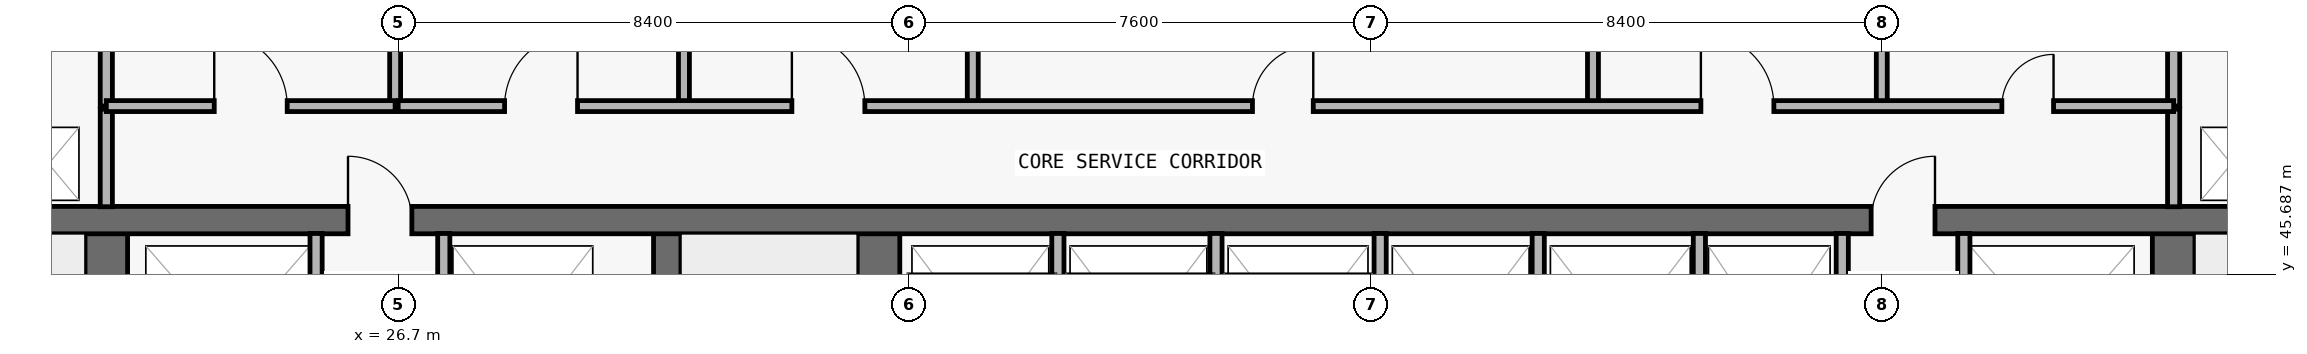
"""IFC4 building model, lengths in metres.
Left out: names, types, materials, properties, quantities, classifications, styles, units other than length and angle.
Written with IfcOpenShell. Run it as: python <this file> out.ifc"""

import sys

from ifc_helpers import new_model, si_unit, direction, frame, frame_2d, origin, place, context, subcontext, project, spatial, rectangle, extrude, element, fill, save


model = new_model("IFC4")
c1 = context("Model", 3, precision=1e-05, world=origin(), true_north=direction((0.0, 1.0)))
c2 = subcontext(c1, "Body", "Model", "MODEL_VIEW")
j1 = project(units=[si_unit("LENGTHUNIT", "METRE"), si_unit("PLANEANGLEUNIT", "RADIAN")], contexts=[c1])
p1 = place(None, origin())
s1 = spatial("IfcSite", under=j1, at=p1, CompositionType="ELEMENT")
p2 = place(p1, origin())
s2 = spatial("IfcBuilding", under=s1, at=p2, CompositionType="ELEMENT")
p3 = place(p2, frame((0.0, 0.0, 19.8)))
s3 = spatial("IfcBuildingStorey", under=s2, at=p3, CompositionType="ELEMENT", Elevation=19.8)
p4 = place(p3, frame((21.9, 36.9, 0.0), z_axis=(0.0, 0.0, 1.0), x_axis=(0.0, 1.0, 0.0)))
e1 = element("IfcWall", 1, at=p4, inside=s3, PredefinedType="SHEAR", context=c2, shape_type="SweptSolid", body=[
    extrude(rectangle(XDim=9.675, YDim=0.7, at=frame_2d((4.837, 0.0))), origin(), (0.0, 0.0, 1.0), 4.45),
])
p5 = place(p4, frame((0.65, 0.0, 0.0)))
e2 = element("IfcOpeningElement", 2, at=p5, cuts=e1, PredefinedType="OPENING", context=c2, shape_type="SweptSolid", body=[
    extrude(rectangle(XDim=1.1, YDim=2.15, at=frame_2d((0.55, 1.075))), frame((0.0, 0.36, 0.0), z_axis=(0.0, -1.0, 0.0), x_axis=(1.0, 0.0, 0.0)), (0.0, 0.0, 1.0), 0.72),
])
p6 = place(p3, frame((55.9, 36.9, 0.0), z_axis=(0.0, 0.0, 1.0), x_axis=(0.0, 1.0, 0.0)))
e3 = element("IfcWall", 3, at=p6, inside=s3, PredefinedType="SHEAR", context=c2, shape_type="SweptSolid", body=[
    extrude(rectangle(XDim=9.675, YDim=0.7, at=frame_2d((4.837, 0.0))), origin(), (0.0, 0.0, 1.0), 4.45),
])
p7 = place(p6, frame((0.65, 0.0, 0.0)))
e4 = element("IfcOpeningElement", 4, at=p7, cuts=e3, PredefinedType="OPENING", context=c2, shape_type="SweptSolid", body=[
    extrude(rectangle(XDim=1.1, YDim=2.15, at=frame_2d((0.55, 1.075))), frame((0.0, 0.36, 0.0), z_axis=(0.0, -1.0, 0.0), x_axis=(1.0, 0.0, 0.0)), (0.0, 0.0, 1.0), 0.72),
])
p8 = place(p3, frame((31.125, 36.9, 0.0), z_axis=(0.0, 0.0, 1.0), x_axis=(0.0, 1.0, 0.0)))
e5 = element("IfcWall", 5, at=p8, inside=s3, PredefinedType="SHEAR", context=c2, shape_type="SweptSolid", body=[
    extrude(rectangle(XDim=9.675, YDim=0.45, at=frame_2d((4.837, 0.0))), origin(), (0.0, 0.0, 1.0), 4.45),
])
p9 = place(p3, frame((34.6, 36.9, 0.0), z_axis=(0.0, 0.0, 1.0), x_axis=(0.0, 1.0, 0.0)))
e6 = element("IfcWall", 6, at=p9, inside=s3, PredefinedType="SHEAR", context=c2, shape_type="SweptSolid", body=[
    extrude(rectangle(XDim=9.675, YDim=0.7, at=frame_2d((4.837, 0.0))), origin(), (0.0, 0.0, 1.0), 4.45),
])
p10 = place(p3, frame((18.2, 46.575, 0.0), z_axis=(0.0, 0.0, 1.0), x_axis=(1.0, 0.0, 0.0)))
e7 = element("IfcWall", 7, at=p10, inside=s3, PredefinedType="SHEAR", context=c2, shape_type="SweptSolid", body=[
    extrude(rectangle(XDim=41.4, YDim=0.45, at=frame_2d((20.7, 0.0))), origin(), (0.0, 0.0, 1.0), 4.45),
])
p11 = place(p10, frame((7.675, 0.0, 0.0)))
e8 = element("IfcOpeningElement", 8, at=p11, cuts=e7, PredefinedType="OPENING", context=c2, shape_type="SweptSolid", body=[
    extrude(rectangle(XDim=1.05, YDim=2.15, at=frame_2d((0.525, 1.075))), frame((0.0, 0.235, 0.0), z_axis=(0.0, -1.0, 0.0), x_axis=(1.0, 0.0, 0.0)), (0.0, 0.0, 1.0), 0.47),
])
p12 = place(p10, frame((32.725, 0.0, 0.0)))
e9 = element("IfcOpeningElement", 9, at=p12, cuts=e7, PredefinedType="OPENING", context=c2, shape_type="SweptSolid", body=[
    extrude(rectangle(XDim=1.05, YDim=2.15, at=frame_2d((0.525, 1.075))), frame((0.0, 0.235, 0.0), z_axis=(0.0, -1.0, 0.0), x_axis=(1.0, 0.0, 0.0)), (0.0, 0.0, 1.0), 0.47),
])
p13 = place(p3, frame((21.9, 46.795, 0.0), z_axis=(0.0, 0.0, 1.0), x_axis=(0.0, 1.0, 0.0)))
e10 = element("IfcWall", 10, at=p13, inside=s3, PredefinedType="PARTITIONING", context=c2, shape_type="SweptSolid", body=[
    extrude(rectangle(XDim=1.605, YDim=0.2, at=frame_2d((0.802, 0.0))), origin(), (0.0, 0.0, 1.0), 4.45),
])
p14 = place(p3, frame((21.9, 48.45, 0.0), z_axis=(0.0, 0.0, 1.0), x_axis=(0.0, 1.0, 0.0)))
e11 = element("IfcWall", 11, at=p14, inside=s3, PredefinedType="PARTITIONING", context=c2, shape_type="SweptSolid", body=[
    extrude(rectangle(XDim=1.405, YDim=0.2, at=frame_2d((0.703, 0.0))), origin(), (0.0, 0.0, 1.0), 4.45),
])
p15 = place(p3, frame((25.35, 43.17, 0.0), z_axis=(0.0, 0.0, 1.0), x_axis=(0.0, 1.0, 0.0)))
e12 = element("IfcWall", 12, at=p15, inside=s3, PredefinedType="PARTITIONING", context=c2, shape_type="SweptSolid", body=[
    extrude(rectangle(XDim=3.185, YDim=0.2, at=frame_2d((1.593, 0.0))), origin(), (0.0, 0.0, 1.0), 4.45),
])
p16 = place(p3, frame((26.65, 48.45, 0.0), z_axis=(0.0, 0.0, 1.0), x_axis=(0.0, 1.0, 0.0)))
e13 = element("IfcWall", 13, at=p16, inside=s3, PredefinedType="PARTITIONING", context=c2, shape_type="SweptSolid", body=[
    extrude(rectangle(XDim=1.405, YDim=0.18, at=frame_2d((0.703, 0.0))), origin(), (0.0, 0.0, 1.0), 4.45),
])
p17 = place(p3, frame((27.45, 43.17, 0.0), z_axis=(0.0, 0.0, 1.0), x_axis=(0.0, 1.0, 0.0)))
e14 = element("IfcWall", 14, at=p17, inside=s3, PredefinedType="PARTITIONING", context=c2, shape_type="SweptSolid", body=[
    extrude(rectangle(XDim=3.185, YDim=0.2, at=frame_2d((1.593, 0.0))), origin(), (0.0, 0.0, 1.0), 4.45),
])
for number, where, z_axis, x_axis in (
    (15, (31.4, 48.45, 0.0), (0.0, 0.0, 1.0), (0.0, 1.0, 0.0)),
    (16, (36.15, 48.45, 0.0), (0.0, 0.0, 1.0), (0.0, 1.0, 0.0)),
):
    element("IfcWall", number, at=place(p3, frame(where, z_axis=z_axis, x_axis=x_axis)), inside=s3, PredefinedType="PARTITIONING", context=c2, shape_type="SweptSolid", body=[
        extrude(rectangle(XDim=1.405, YDim=0.18, at=frame_2d((0.703, 0.0))), origin(), (0.0, 0.0, 1.0), 4.45),
    ])
for number, where, z_axis, x_axis in (
    (17, (37.55, 43.17, 0.0), (0.0, 0.0, 1.0), (0.0, 1.0, 0.0)),
    (18, (40.15, 43.17, 0.0), (0.0, 0.0, 1.0), (0.0, 1.0, 0.0)),
    (19, (42.85, 43.17, 0.0), (0.0, 0.0, 1.0), (0.0, 1.0, 0.0)),
    (20, (45.45, 43.17, 0.0), (0.0, 0.0, 1.0), (0.0, 1.0, 0.0)),
):
    element("IfcWall", number, at=place(p3, frame(where, z_axis=z_axis, x_axis=x_axis)), inside=s3, PredefinedType="PARTITIONING", context=c2, shape_type="SweptSolid", body=[
        extrude(rectangle(XDim=3.185, YDim=0.2, at=frame_2d((1.593, 0.0))), origin(), (0.0, 0.0, 1.0), 4.45),
    ])
p18 = place(p3, frame((46.35, 48.45, 0.0), z_axis=(0.0, 0.0, 1.0), x_axis=(0.0, 1.0, 0.0)))
e21 = element("IfcWall", 21, at=p18, inside=s3, PredefinedType="PARTITIONING", context=c2, shape_type="SweptSolid", body=[
    extrude(rectangle(XDim=1.405, YDim=0.18, at=frame_2d((0.703, 0.0))), origin(), (0.0, 0.0, 1.0), 4.45),
])
for number, where, z_axis, x_axis in (
    (22, (48.1, 43.17, 0.0), (0.0, 0.0, 1.0), (0.0, 1.0, 0.0)),
    (23, (50.45, 43.17, 0.0), (0.0, 0.0, 1.0), (0.0, 1.0, 0.0)),
):
    element("IfcWall", number, at=place(p3, frame(where, z_axis=z_axis, x_axis=x_axis)), inside=s3, PredefinedType="PARTITIONING", context=c2, shape_type="SweptSolid", body=[
        extrude(rectangle(XDim=3.185, YDim=0.2, at=frame_2d((1.593, 0.0))), origin(), (0.0, 0.0, 1.0), 4.45),
    ])
p19 = place(p3, frame((51.1, 48.45, 0.0), z_axis=(0.0, 0.0, 1.0), x_axis=(0.0, 1.0, 0.0)))
e24 = element("IfcWall", 24, at=p19, inside=s3, PredefinedType="PARTITIONING", context=c2, shape_type="SweptSolid", body=[
    extrude(rectangle(XDim=1.405, YDim=0.18, at=frame_2d((0.703, 0.0))), origin(), (0.0, 0.0, 1.0), 4.45),
])
p20 = place(p3, frame((52.45, 43.17, 0.0), z_axis=(0.0, 0.0, 1.0), x_axis=(0.0, 1.0, 0.0)))
e25 = element("IfcWall", 25, at=p20, inside=s3, PredefinedType="PARTITIONING", context=c2, shape_type="SweptSolid", body=[
    extrude(rectangle(XDim=3.185, YDim=0.2, at=frame_2d((1.593, 0.0))), origin(), (0.0, 0.0, 1.0), 4.45),
])
p21 = place(p3, frame((55.9, 46.795, 0.0), z_axis=(0.0, 0.0, 1.0), x_axis=(0.0, 1.0, 0.0)))
e26 = element("IfcWall", 26, at=p21, inside=s3, PredefinedType="PARTITIONING", context=c2, shape_type="SweptSolid", body=[
    extrude(rectangle(XDim=1.605, YDim=0.2, at=frame_2d((0.802, 0.0))), origin(), (0.0, 0.0, 1.0), 4.45),
])
p22 = place(p3, frame((55.9, 48.45, 0.0), z_axis=(0.0, 0.0, 1.0), x_axis=(0.0, 1.0, 0.0)))
e27 = element("IfcWall", 27, at=p22, inside=s3, PredefinedType="PARTITIONING", context=c2, shape_type="SweptSolid", body=[
    extrude(rectangle(XDim=1.405, YDim=0.2, at=frame_2d((0.703, 0.0))), origin(), (0.0, 0.0, 1.0), 4.45),
])
p23 = place(p3, frame((21.9, 48.45, 0.0), z_axis=(0.0, 0.0, 1.0), x_axis=(1.0, 0.0, 0.0)))
e28 = element("IfcWall", 28, at=p23, inside=s3, PredefinedType="PARTITIONING", context=c2, shape_type="SweptSolid", body=[
    extrude(rectangle(XDim=4.75, YDim=0.18, at=frame_2d((2.375, 0.0))), origin(), (0.0, 0.0, 1.0), 4.45),
])
p24 = place(p23, frame((1.775, 0.0, 0.0)))
e29 = element("IfcOpeningElement", 29, at=p24, cuts=e28, PredefinedType="OPENING", context=c2, shape_type="SweptSolid", body=[
    extrude(rectangle(XDim=1.2, YDim=2.2, at=frame_2d((0.6, 1.1))), frame((0.0, 0.1, 0.0), z_axis=(0.0, -1.0, 0.0), x_axis=(1.0, 0.0, 0.0)), (0.0, 0.0, 1.0), 0.2),
])
p25 = place(p3, frame((26.7, 48.45, 0.0), z_axis=(0.0, 0.0, 1.0), x_axis=(1.0, 0.0, 0.0)))
e30 = element("IfcWall", 30, at=p25, inside=s3, PredefinedType="PARTITIONING", context=c2, shape_type="SweptSolid", body=[
    extrude(rectangle(XDim=29.2, YDim=0.18, at=frame_2d((14.6, 0.0))), origin(), (0.0, 0.0, 1.0), 4.45),
])
p26 = place(p25, frame((1.75, 0.0, 0.0)))
e31 = element("IfcOpeningElement", 31, at=p26, cuts=e30, PredefinedType="OPENING", context=c2, shape_type="SweptSolid", body=[
    extrude(rectangle(XDim=1.2, YDim=2.2, at=frame_2d((0.6, 1.1))), frame((0.0, 0.1, 0.0), z_axis=(0.0, -1.0, 0.0), x_axis=(1.0, 0.0, 0.0)), (0.0, 0.0, 1.0), 0.2),
])
p27 = place(p25, frame((6.475, 0.0, 0.0)))
e32 = element("IfcOpeningElement", 32, at=p27, cuts=e30, PredefinedType="OPENING", context=c2, shape_type="SweptSolid", body=[
    extrude(rectangle(XDim=1.2, YDim=2.2, at=frame_2d((0.6, 1.1))), frame((0.0, 0.1, 0.0), z_axis=(0.0, -1.0, 0.0), x_axis=(1.0, 0.0, 0.0)), (0.0, 0.0, 1.0), 0.2),
])
p28 = place(p25, frame((14.05, 0.0, 0.0)))
e33 = element("IfcOpeningElement", 33, at=p28, cuts=e30, PredefinedType="OPENING", context=c2, shape_type="SweptSolid", body=[
    extrude(rectangle(XDim=1.0, YDim=2.2, at=frame_2d((0.5, 1.1))), frame((0.0, 0.1, 0.0), z_axis=(0.0, -1.0, 0.0), x_axis=(1.0, 0.0, 0.0)), (0.0, 0.0, 1.0), 0.2),
])
p29 = place(p25, frame((21.425, 0.0, 0.0)))
e34 = element("IfcOpeningElement", 34, at=p29, cuts=e30, PredefinedType="OPENING", context=c2, shape_type="SweptSolid", body=[
    extrude(rectangle(XDim=1.2, YDim=2.2, at=frame_2d((0.6, 1.1))), frame((0.0, 0.1, 0.0), z_axis=(0.0, -1.0, 0.0), x_axis=(1.0, 0.0, 0.0)), (0.0, 0.0, 1.0), 0.2),
])
p30 = place(p25, frame((26.375, 0.0, 0.0)))
e35 = element("IfcOpeningElement", 35, at=p30, cuts=e30, PredefinedType="OPENING", context=c2, shape_type="SweptSolid", body=[
    extrude(rectangle(XDim=0.85, YDim=2.1, at=frame_2d((0.425, 1.05))), frame((0.0, 0.1, 0.0), z_axis=(0.0, -1.0, 0.0), x_axis=(1.0, 0.0, 0.0)), (0.0, 0.0, 1.0), 0.2),
])
p31 = place(p11, origin())
e36 = element("IfcDoor", 36, at=p31, inside=s3, OperationType="SINGLE_SWING_LEFT", PredefinedType="DOOR", context=c2, shape_type="SweptSolid", body=[
    extrude(rectangle(XDim=1.05, YDim=2.15, at=frame_2d((0.525, 1.075))), frame((0.0, 0.025, 0.0), z_axis=(0.0, -1.0, 0.0), x_axis=(1.0, 0.0, 0.0)), (0.0, 0.0, 1.0), 0.05),
])
fill(e8, e36)
p32 = place(p12, origin())
e37 = element("IfcDoor", 37, at=p32, inside=s3, OperationType="SINGLE_SWING_RIGHT", PredefinedType="DOOR", context=c2, shape_type="SweptSolid", body=[
    extrude(rectangle(XDim=1.05, YDim=2.15, at=frame_2d((0.525, 1.075))), frame((0.0, 0.025, 0.0), z_axis=(0.0, -1.0, 0.0), x_axis=(1.0, 0.0, 0.0)), (0.0, 0.0, 1.0), 0.05),
])
fill(e9, e37)
p33 = place(p24, origin())
e38 = element("IfcDoor", 38, at=p33, inside=s3, OperationType="SINGLE_SWING_LEFT", PredefinedType="DOOR", context=c2, shape_type="SweptSolid", body=[
    extrude(rectangle(XDim=1.2, YDim=2.2, at=frame_2d((0.6, 1.1))), frame((0.0, 0.025, 0.0), z_axis=(0.0, -1.0, 0.0), x_axis=(1.0, 0.0, 0.0)), (0.0, 0.0, 1.0), 0.05),
])
fill(e29, e38)
p34 = place(p26, origin())
e39 = element("IfcDoor", 39, at=p34, inside=s3, OperationType="SINGLE_SWING_RIGHT", PredefinedType="DOOR", context=c2, shape_type="SweptSolid", body=[
    extrude(rectangle(XDim=1.2, YDim=2.2, at=frame_2d((0.6, 1.1))), frame((0.0, 0.025, 0.0), z_axis=(0.0, -1.0, 0.0), x_axis=(1.0, 0.0, 0.0)), (0.0, 0.0, 1.0), 0.05),
])
fill(e31, e39)
p35 = place(p27, origin())
e40 = element("IfcDoor", 40, at=p35, inside=s3, OperationType="SINGLE_SWING_LEFT", PredefinedType="DOOR", context=c2, shape_type="SweptSolid", body=[
    extrude(rectangle(XDim=1.2, YDim=2.2, at=frame_2d((0.6, 1.1))), frame((0.0, 0.025, 0.0), z_axis=(0.0, -1.0, 0.0), x_axis=(1.0, 0.0, 0.0)), (0.0, 0.0, 1.0), 0.05),
])
fill(e32, e40)
p36 = place(p28, origin())
e41 = element("IfcDoor", 41, at=p36, inside=s3, OperationType="SINGLE_SWING_RIGHT", PredefinedType="DOOR", context=c2, shape_type="SweptSolid", body=[
    extrude(rectangle(XDim=1.0, YDim=2.2, at=frame_2d((0.5, 1.1))), frame((0.0, 0.025, 0.0), z_axis=(0.0, -1.0, 0.0), x_axis=(1.0, 0.0, 0.0)), (0.0, 0.0, 1.0), 0.05),
])
fill(e33, e41)
p37 = place(p29, origin())
e42 = element("IfcDoor", 42, at=p37, inside=s3, OperationType="SINGLE_SWING_LEFT", PredefinedType="DOOR", context=c2, shape_type="SweptSolid", body=[
    extrude(rectangle(XDim=1.2, YDim=2.2, at=frame_2d((0.6, 1.1))), frame((0.0, 0.025, 0.0), z_axis=(0.0, -1.0, 0.0), x_axis=(1.0, 0.0, 0.0)), (0.0, 0.0, 1.0), 0.05),
])
fill(e34, e42)
p38 = place(p30, origin())
e43 = element("IfcDoor", 43, at=p38, inside=s3, OperationType="SINGLE_SWING_RIGHT", PredefinedType="DOOR", context=c2, shape_type="SweptSolid", body=[
    extrude(rectangle(XDim=0.85, YDim=2.1, at=frame_2d((0.425, 1.05))), frame((0.0, 0.025, 0.0), z_axis=(0.0, -1.0, 0.0), x_axis=(1.0, 0.0, 0.0)), (0.0, 0.0, 1.0), 0.05),
])
fill(e35, e43)
save(model, sys.argv[1])
